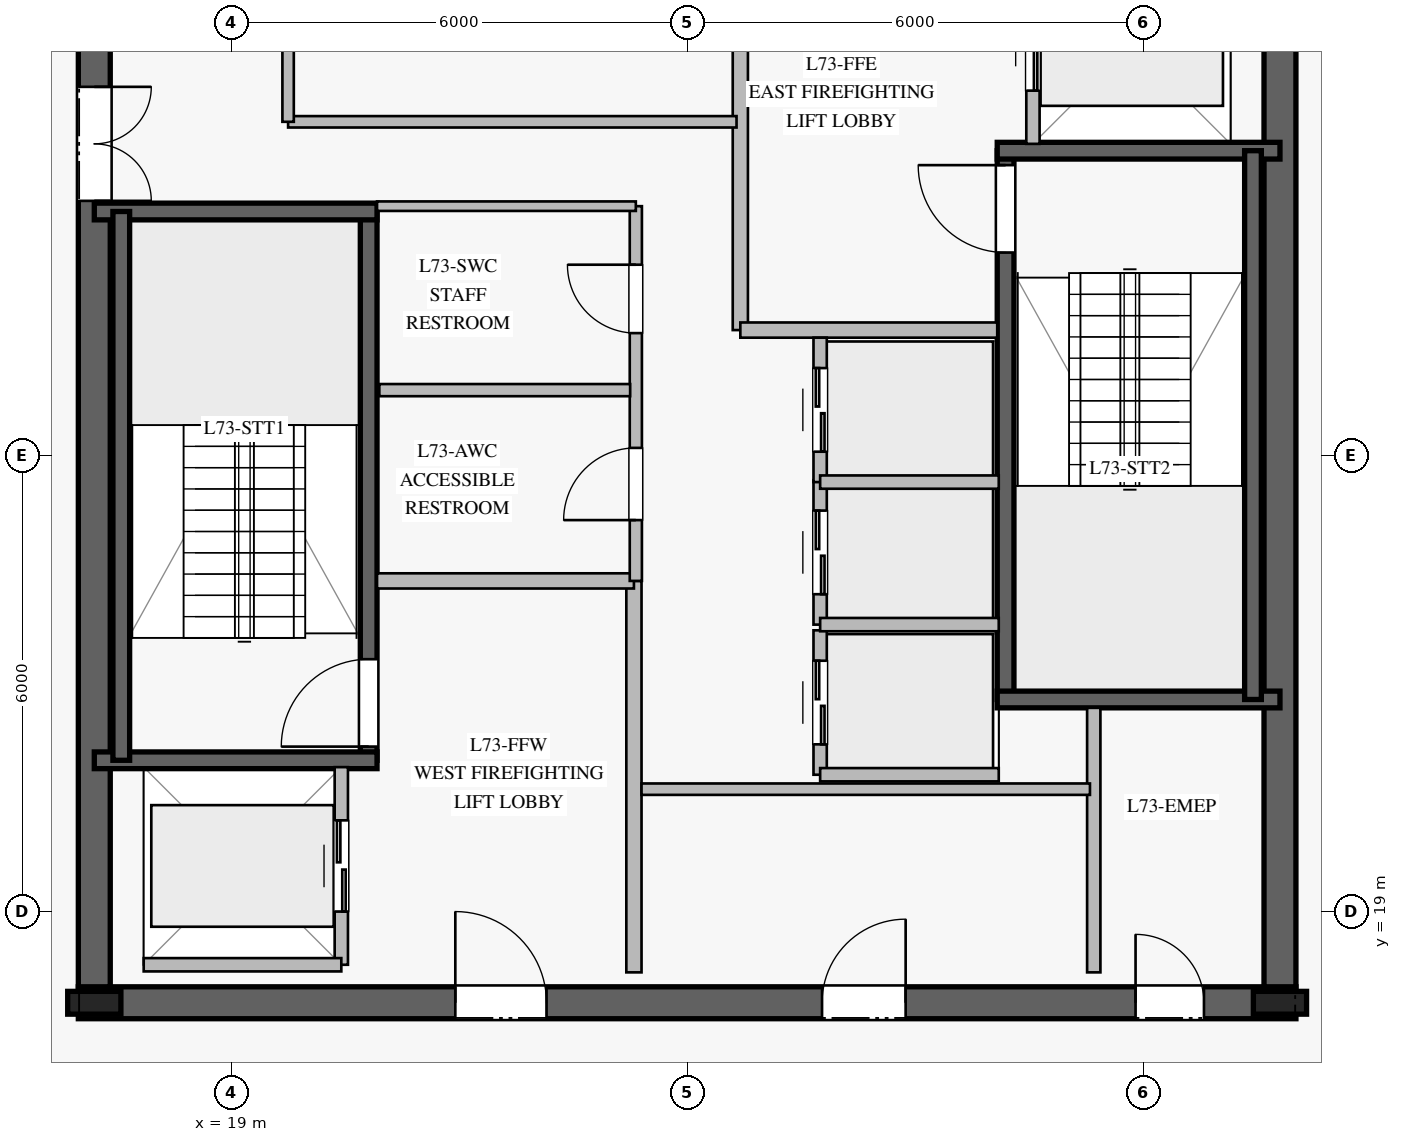
"""IFC4 building model, lengths in metres.
Left out: names, types, materials, properties, quantities, classifications, styles, units other than length and angle.
Written with IfcOpenShell. Run it as: python <this file> out.ifc"""

import sys

from ifc_helpers import new_model, si_unit, direction, frame, frame_2d, origin, origin_2d, place, context, subcontext, project, spatial, rectangle, i_section, extrude, element, fill, save


model = new_model("IFC4")
c1 = context("Model", 3, precision=1e-05, world=origin(), true_north=direction((0.0, 1.0)))
c2 = subcontext(c1, "Body", "Model", "MODEL_VIEW")
j1 = project(units=[si_unit("LENGTHUNIT", "METRE"), si_unit("PLANEANGLEUNIT", "RADIAN")], contexts=[c1])
p1 = place(None, origin())
s1 = spatial("IfcSite", under=j1, at=p1, CompositionType="ELEMENT")
p2 = place(p1, origin())
s2 = spatial("IfcBuilding", under=s1, at=p2, CompositionType="ELEMENT")
p3 = place(p2, frame((0.0, 0.0, 302.2)))
s3 = spatial("IfcBuildingStorey", under=s2, at=p3, CompositionType="ELEMENT", Elevation=302.2)
p4 = place(p3, frame((16.99, 17.8, 0.0), z_axis=(0.0, 0.0, 1.0), x_axis=(1.0, 0.0, 0.0)))
e1 = element("IfcWall", 1, at=p4, inside=s3, PredefinedType="SHEAR", context=c2, shape_type="SweptSolid", body=[
    extrude(rectangle(XDim=16.02, YDim=0.42, at=frame_2d((8.01, 0.0))), origin(), (0.0, 0.0, 1.0), 3.78),
])
p5 = place(p4, frame((4.96, 0.0, 0.0)))
e2 = element("IfcOpeningElement", 2, at=p5, cuts=e1, PredefinedType="OPENING", context=c2, shape_type="SweptSolid", body=[
    extrude(rectangle(XDim=1.2, YDim=2.25, at=frame_2d((0.6, 1.125))), frame((0.0, 0.22, 0.0), z_axis=(0.0, -1.0, 0.0), x_axis=(1.0, 0.0, 0.0)), (0.0, 0.0, 1.0), 0.44),
])
p6 = place(p4, frame((13.91, 0.0, 0.0)))
e3 = element("IfcOpeningElement", 3, at=p6, cuts=e1, PredefinedType="OPENING", context=c2, shape_type="SweptSolid", body=[
    extrude(rectangle(XDim=0.9, YDim=2.1, at=frame_2d((0.45, 1.05))), frame((0.0, 0.22, 0.0), z_axis=(0.0, -1.0, 0.0), x_axis=(1.0, 0.0, 0.0)), (0.0, 0.0, 1.0), 0.44),
])
p7 = place(p4, frame((9.785, 0.0, 0.0)))
e4 = element("IfcOpeningElement", 4, at=p7, cuts=e1, PredefinedType="OPENING", context=c2, shape_type="SweptSolid", body=[
    extrude(rectangle(XDim=1.1, YDim=2.2, at=frame_2d((0.55, 1.1))), frame((0.0, 0.22, 0.0), z_axis=(0.0, -1.0, 0.0), x_axis=(1.0, 0.0, 0.0)), (0.0, 0.0, 1.0), 0.44),
])
p8 = place(p3, frame((17.2, 31.99, 0.0), z_axis=(0.0, 0.0, 1.0), x_axis=(0.0, -1.0, 0.0)))
e5 = element("IfcWall", 5, at=p8, inside=s3, PredefinedType="SHEAR", context=c2, shape_type="SweptSolid", body=[
    extrude(rectangle(XDim=13.98, YDim=0.42, at=frame_2d((6.99, 0.0))), origin(), (0.0, 0.0, 1.0), 3.78),
])
p9 = place(p8, frame((2.14, 0.0, 0.0)))
e6 = element("IfcOpeningElement", 6, at=p9, cuts=e5, PredefinedType="OPENING", context=c2, shape_type="SweptSolid", body=[
    extrude(rectangle(XDim=1.5, YDim=2.2, at=frame_2d((0.75, 1.1))), frame((0.0, 0.22, 0.0), z_axis=(0.0, -1.0, 0.0), x_axis=(1.0, 0.0, 0.0)), (0.0, 0.0, 1.0), 0.44),
])
p10 = place(p3, frame((32.8, 18.01, 0.0), z_axis=(0.0, 0.0, 1.0), x_axis=(0.0, 1.0, 0.0)))
e7 = element("IfcWall", 7, at=p10, inside=s3, PredefinedType="SHEAR", context=c2, shape_type="SweptSolid", body=[
    extrude(rectangle(XDim=13.98, YDim=0.42, at=frame_2d((6.99, 0.0))), origin(), (0.0, 0.0, 1.0), 3.78),
])
for number, where, z_axis, x_axis in (
    (8, (17.2, 17.8, 0.0), (0.0, 0.0, 1.0), (1.0, 0.0, 0.0)),
    (9, (32.8, 17.8, 0.0), (0.0, 0.0, 1.0), (1.0, 0.0, 0.0)),
):
    element("IfcColumn", number, at=place(p3, frame(where, z_axis=z_axis, x_axis=x_axis)), inside=s3, PredefinedType="COLUMN", context=c2, shape_type="SweptSolid", body=[
        extrude(i_section(OverallWidth=0.3, OverallDepth=0.7, WebThickness=0.017, FlangeThickness=0.032, at=origin_2d()), origin(), (0.0, 0.0, 1.0), 4.0),
    ])
p11 = place(p3, frame((20.81, 20.99, 0.0), z_axis=(0.0, 0.0, 1.0), x_axis=(0.0, 1.0, 0.0)))
e10 = element("IfcWall", 10, at=p11, inside=s3, PredefinedType="SOLIDWALL", context=c2, shape_type="SweptSolid", body=[
    extrude(rectangle(XDim=7.22, YDim=0.22, at=frame_2d((3.61, 0.0))), origin(), (0.0, 0.0, 1.0), 3.78),
])
p12 = place(p11, frame((0.18, 0.0, 0.0)))
e11 = element("IfcOpeningElement", 11, at=p12, cuts=e10, PredefinedType="OPENING", context=c2, shape_type="SweptSolid", body=[
    extrude(rectangle(XDim=1.15, YDim=2.2, at=frame_2d((0.575, 1.1))), frame((0.0, 0.12, 0.0), z_axis=(0.0, -1.0, 0.0), x_axis=(1.0, 0.0, 0.0)), (0.0, 0.0, 1.0), 0.24),
])
for number, where, z_axis, x_axis in (
    (12, (17.2, 20.99, 0.0), (0.0, 0.0, 1.0), (1.0, 0.0, 0.0)),
    (13, (17.2, 28.21, 0.0), (0.0, 0.0, 1.0), (1.0, 0.0, 0.0)),
):
    element("IfcWall", number, at=place(p3, frame(where, z_axis=z_axis, x_axis=x_axis)), inside=s3, PredefinedType="SOLIDWALL", context=c2, shape_type="SweptSolid", body=[
        extrude(rectangle(XDim=3.72, YDim=0.22, at=frame_2d((1.86, 0.0))), origin(), (0.0, 0.0, 1.0), 3.78),
    ])
p13 = place(p3, frame((17.555, 28.21, 0.0), z_axis=(0.0, 0.0, 1.0), x_axis=(0.0, -1.0, 0.0)))
e14 = element("IfcWall", 14, at=p13, inside=s3, PredefinedType="SOLIDWALL", context=c2, shape_type="SweptSolid", body=[
    extrude(rectangle(XDim=7.22, YDim=0.22, at=frame_2d((3.61, 0.0))), origin(), (0.0, 0.0, 1.0), 3.78),
])
p14 = place(p3, frame((29.19, 21.79, 0.0), z_axis=(0.0, 0.0, 1.0), x_axis=(0.0, 1.0, 0.0)))
e15 = element("IfcWall", 15, at=p14, inside=s3, PredefinedType="SOLIDWALL", context=c2, shape_type="SweptSolid", body=[
    extrude(rectangle(XDim=7.22, YDim=0.22, at=frame_2d((3.61, 0.0))), origin(), (0.0, 0.0, 1.0), 3.78),
])
p15 = place(p14, frame((5.88, 0.0, 0.0)))
e16 = element("IfcOpeningElement", 16, at=p15, cuts=e15, PredefinedType="OPENING", context=c2, shape_type="SweptSolid", body=[
    extrude(rectangle(XDim=1.15, YDim=2.2, at=frame_2d((0.575, 1.1))), frame((0.0, 0.12, 0.0), z_axis=(0.0, -1.0, 0.0), x_axis=(1.0, 0.0, 0.0)), (0.0, 0.0, 1.0), 0.24),
])
for number, where, z_axis, x_axis in (
    (17, (29.08, 21.79, 0.0), (0.0, 0.0, 1.0), (1.0, 0.0, 0.0)),
    (18, (29.08, 29.01, 0.0), (0.0, 0.0, 1.0), (1.0, 0.0, 0.0)),
):
    element("IfcWall", number, at=place(p3, frame(where, z_axis=z_axis, x_axis=x_axis)), inside=s3, PredefinedType="SOLIDWALL", context=c2, shape_type="SweptSolid", body=[
        extrude(rectangle(XDim=3.72, YDim=0.22, at=frame_2d((1.86, 0.0))), origin(), (0.0, 0.0, 1.0), 3.78),
    ])
p16 = place(p3, frame((32.445, 29.01, 0.0), z_axis=(0.0, 0.0, 1.0), x_axis=(0.0, -1.0, 0.0)))
e19 = element("IfcWall", 19, at=p16, inside=s3, PredefinedType="SOLIDWALL", context=c2, shape_type="SweptSolid", body=[
    extrude(rectangle(XDim=7.22, YDim=0.22, at=frame_2d((3.61, 0.0))), origin(), (0.0, 0.0, 1.0), 3.78),
])
p17 = place(p3, frame((24.3, 18.2, 0.0), z_axis=(0.0, 0.0, 1.0), x_axis=(0.0, 1.0, 0.0)))
e20 = element("IfcWall", 20, at=p17, inside=s3, PredefinedType="PARTITIONING", context=c2, shape_type="SweptSolid", body=[
    extrude(rectangle(XDim=5.15, YDim=0.2, at=frame_2d((2.575, 0.0))), origin(), (0.0, 0.0, 1.0), 3.78),
])
p18 = place(p3, frame((20.92, 23.35, 0.0), z_axis=(0.0, 0.0, 1.0), x_axis=(1.0, 0.0, 0.0)))
e21 = element("IfcWall", 21, at=p18, inside=s3, PredefinedType="PARTITIONING", context=c2, shape_type="SweptSolid", body=[
    extrude(rectangle(XDim=3.38, YDim=0.2, at=frame_2d((1.69, 0.0))), origin(), (0.0, 0.0, 1.0), 3.78),
])
p19 = place(p3, frame((25.7, 26.65, 0.0), z_axis=(0.0, 0.0, 1.0), x_axis=(0.0, 1.0, 0.0)))
e22 = element("IfcWall", 22, at=p19, inside=s3, PredefinedType="PARTITIONING", context=c2, shape_type="SweptSolid", body=[
    extrude(rectangle(XDim=5.15, YDim=0.2, at=frame_2d((2.575, 0.0))), origin(), (0.0, 0.0, 1.0), 3.78),
])
p20 = place(p3, frame((25.7, 26.65, 0.0), z_axis=(0.0, 0.0, 1.0), x_axis=(1.0, 0.0, 0.0)))
e23 = element("IfcWall", 23, at=p20, inside=s3, PredefinedType="PARTITIONING", context=c2, shape_type="SweptSolid", body=[
    extrude(rectangle(XDim=3.38, YDim=0.2, at=frame_2d((1.69, 0.0))), origin(), (0.0, 0.0, 1.0), 3.78),
])
p21 = place(p3, frame((24.325, 23.35, 0.0), z_axis=(0.0, 0.0, 1.0), x_axis=(0.0, 1.0, 0.0)))
e24 = element("IfcWall", 24, at=p21, inside=s3, PredefinedType="PLUMBINGWALL", context=c2, shape_type="SweptSolid", body=[
    extrude(rectangle(XDim=4.93, YDim=0.16, at=frame_2d((2.465, 0.0))), origin(), (0.0, 0.0, 1.0), 3.78),
])
p22 = place(p21, frame((0.8, 0.0, 0.0)))
e25 = element("IfcOpeningElement", 25, at=p22, cuts=e24, PredefinedType="OPENING", context=c2, shape_type="SweptSolid", body=[
    extrude(rectangle(XDim=0.95, YDim=2.1, at=frame_2d((0.475, 1.05))), frame((0.0, 0.09, 0.0), z_axis=(0.0, -1.0, 0.0), x_axis=(1.0, 0.0, 0.0)), (0.0, 0.0, 1.0), 0.18),
])
p23 = place(p21, frame((3.26, 0.0, 0.0)))
e26 = element("IfcOpeningElement", 26, at=p23, cuts=e24, PredefinedType="OPENING", context=c2, shape_type="SweptSolid", body=[
    extrude(rectangle(XDim=0.9, YDim=2.1, at=frame_2d((0.45, 1.05))), frame((0.0, 0.09, 0.0), z_axis=(0.0, -1.0, 0.0), x_axis=(1.0, 0.0, 0.0)), (0.0, 0.0, 1.0), 0.18),
])
p24 = place(p3, frame((20.92, 28.28, 0.0), z_axis=(0.0, 0.0, 1.0), x_axis=(1.0, 0.0, 0.0)))
e27 = element("IfcWall", 27, at=p24, inside=s3, PredefinedType="PARTITIONING", context=c2, shape_type="SweptSolid", body=[
    extrude(rectangle(XDim=3.405, YDim=0.125, at=frame_2d((1.703, 0.0))), origin(), (0.0, 0.0, 1.0), 3.78),
])
p25 = place(p3, frame((20.95, 25.86, 0.0), z_axis=(0.0, 0.0, 1.0), x_axis=(1.0, 0.0, 0.0)))
e28 = element("IfcWall", 28, at=p25, inside=s3, PredefinedType="PLUMBINGWALL", context=c2, shape_type="SweptSolid", body=[
    extrude(rectangle(XDim=3.3, YDim=0.16, at=frame_2d((1.65, 0.0))), origin(), (0.0, 0.0, 1.0), 3.78),
])
p26 = place(p3, frame((30.35, 18.2, 0.0), z_axis=(0.0, 0.0, 1.0), x_axis=(0.0, 1.0, 0.0)))
e29 = element("IfcWall", 29, at=p26, inside=s3, PredefinedType="PARTITIONING", context=c2, shape_type="SweptSolid", body=[
    extrude(rectangle(XDim=3.48, YDim=0.175, at=frame_2d((1.74, 0.0))), origin(), (0.0, 0.0, 1.0), 3.78),
])
p27 = place(p3, frame((24.4, 20.61, 0.0), z_axis=(0.0, 0.0, 1.0), x_axis=(1.0, 0.0, 0.0)))
e30 = element("IfcWall", 30, at=p27, inside=s3, PredefinedType="PARTITIONING", context=c2, shape_type="SweptSolid", body=[
    extrude(rectangle(XDim=5.9, YDim=0.15, at=frame_2d((2.95, 0.0))), origin(), (0.0, 0.0, 1.0), 3.78),
])
p28 = place(p3, frame((19.75, 29.39, 0.0), z_axis=(0.0, 0.0, 1.0), x_axis=(1.0, 0.0, 0.0)))
e31 = element("IfcWall", 31, at=p28, inside=s3, PredefinedType="PARTITIONING", context=c2, shape_type="SweptSolid", body=[
    extrude(rectangle(XDim=5.9, YDim=0.15, at=frame_2d((2.95, 0.0))), origin(), (0.0, 0.0, 1.0), 3.78),
])
p29 = place(p3, frame((19.75, 29.39, 0.0), z_axis=(0.0, 0.0, 1.0), x_axis=(0.0, 1.0, 0.0)))
e32 = element("IfcWall", 32, at=p29, inside=s3, PredefinedType="PARTITIONING", context=c2, shape_type="SweptSolid", body=[
    extrude(rectangle(XDim=2.41, YDim=0.15, at=frame_2d((1.205, 0.0))), origin(), (0.0, 0.0, 1.0), 3.78),
])
p30 = place(p3, frame((26.75, 20.8, 0.0), z_axis=(0.0, 0.0, 1.0), x_axis=(0.0, 1.0, 0.0)))
e33 = element("IfcWall", 33, at=p30, inside=s3, PredefinedType="PARTITIONING", context=c2, shape_type="SweptSolid", body=[
    extrude(rectangle(XDim=1.9, YDim=0.175, at=frame_2d((0.95, 0.0))), origin(), (0.0, 0.0, 1.0), 3.78),
])
p31 = place(p30, frame((0.4, 0.0, 0.0)))
e34 = element("IfcOpeningElement", 34, at=p31, cuts=e33, PredefinedType="OPENING", context=c2, shape_type="SweptSolid", body=[
    extrude(rectangle(XDim=1.1, YDim=2.2, at=frame_2d((0.55, 1.1))), frame((0.0, 0.098, 0.0), z_axis=(0.0, -1.0, 0.0), x_axis=(1.0, 0.0, 0.0)), (0.0, 0.0, 1.0), 0.195),
])
p32 = place(p3, frame((26.75, 20.8, 0.0), z_axis=(0.0, 0.0, 1.0), x_axis=(1.0, 0.0, 0.0)))
e35 = element("IfcWall", 35, at=p32, inside=s3, PredefinedType="PARTITIONING", context=c2, shape_type="SweptSolid", body=[
    extrude(rectangle(XDim=2.35, YDim=0.175, at=frame_2d((1.175, 0.0))), origin(), (0.0, 0.0, 1.0), 3.78),
])
p33 = place(p3, frame((26.75, 22.775, 0.0), z_axis=(0.0, 0.0, 1.0), x_axis=(0.0, 1.0, 0.0)))
e36 = element("IfcWall", 36, at=p33, inside=s3, PredefinedType="PARTITIONING", context=c2, shape_type="SweptSolid", body=[
    extrude(rectangle(XDim=1.9, YDim=0.175, at=frame_2d((0.95, 0.0))), origin(), (0.0, 0.0, 1.0), 3.78),
])
p34 = place(p33, frame((0.4, 0.0, 0.0)))
e37 = element("IfcOpeningElement", 37, at=p34, cuts=e36, PredefinedType="OPENING", context=c2, shape_type="SweptSolid", body=[
    extrude(rectangle(XDim=1.1, YDim=2.2, at=frame_2d((0.55, 1.1))), frame((0.0, 0.098, 0.0), z_axis=(0.0, -1.0, 0.0), x_axis=(1.0, 0.0, 0.0)), (0.0, 0.0, 1.0), 0.195),
])
p35 = place(p3, frame((26.75, 22.775, 0.0), z_axis=(0.0, 0.0, 1.0), x_axis=(1.0, 0.0, 0.0)))
e38 = element("IfcWall", 38, at=p35, inside=s3, PredefinedType="PARTITIONING", context=c2, shape_type="SweptSolid", body=[
    extrude(rectangle(XDim=2.35, YDim=0.175, at=frame_2d((1.175, 0.0))), origin(), (0.0, 0.0, 1.0), 3.78),
])
p36 = place(p3, frame((26.75, 24.65, 0.0), z_axis=(0.0, 0.0, 1.0), x_axis=(0.0, 1.0, 0.0)))
e39 = element("IfcWall", 39, at=p36, inside=s3, PredefinedType="PARTITIONING", context=c2, shape_type="SweptSolid", body=[
    extrude(rectangle(XDim=1.9, YDim=0.175, at=frame_2d((0.95, 0.0))), origin(), (0.0, 0.0, 1.0), 3.78),
])
p37 = place(p36, frame((0.4, 0.0, 0.0)))
e40 = element("IfcOpeningElement", 40, at=p37, cuts=e39, PredefinedType="OPENING", context=c2, shape_type="SweptSolid", body=[
    extrude(rectangle(XDim=1.1, YDim=2.2, at=frame_2d((0.55, 1.1))), frame((0.0, 0.098, 0.0), z_axis=(0.0, -1.0, 0.0), x_axis=(1.0, 0.0, 0.0)), (0.0, 0.0, 1.0), 0.195),
])
p38 = place(p3, frame((26.75, 24.65, 0.0), z_axis=(0.0, 0.0, 1.0), x_axis=(1.0, 0.0, 0.0)))
e41 = element("IfcWall", 41, at=p38, inside=s3, PredefinedType="PARTITIONING", context=c2, shape_type="SweptSolid", body=[
    extrude(rectangle(XDim=2.35, YDim=0.175, at=frame_2d((1.175, 0.0))), origin(), (0.0, 0.0, 1.0), 3.78),
])
p39 = place(p3, frame((20.45, 18.3, 0.0), z_axis=(0.0, 0.0, 1.0), x_axis=(0.0, 1.0, 0.0)))
e42 = element("IfcWall", 42, at=p39, inside=s3, PredefinedType="PARTITIONING", context=c2, shape_type="SweptSolid", body=[
    extrude(rectangle(XDim=2.6, YDim=0.175, at=frame_2d((1.3, 0.0))), origin(), (0.0, 0.0, 1.0), 3.78),
])
p40 = place(p39, frame((0.7, 0.0, 0.0)))
e43 = element("IfcOpeningElement", 43, at=p40, cuts=e42, PredefinedType="OPENING", context=c2, shape_type="SweptSolid", body=[
    extrude(rectangle(XDim=1.2, YDim=2.2, at=frame_2d((0.6, 1.1))), frame((0.0, 0.098, 0.0), z_axis=(0.0, -1.0, 0.0), x_axis=(1.0, 0.0, 0.0)), (0.0, 0.0, 1.0), 0.195),
])
p41 = place(p3, frame((17.85, 18.3, 0.0), z_axis=(0.0, 0.0, 1.0), x_axis=(1.0, 0.0, 0.0)))
e44 = element("IfcWall", 44, at=p41, inside=s3, PredefinedType="PARTITIONING", context=c2, shape_type="SweptSolid", body=[
    extrude(rectangle(XDim=2.6, YDim=0.175, at=frame_2d((1.3, 0.0))), origin(), (0.0, 0.0, 1.0), 3.78),
])
p42 = place(p3, frame((29.55, 29.1, 0.0), z_axis=(0.0, 0.0, 1.0), x_axis=(0.0, 1.0, 0.0)))
e45 = element("IfcWall", 45, at=p42, inside=s3, PredefinedType="PARTITIONING", context=c2, shape_type="SweptSolid", body=[
    extrude(rectangle(XDim=2.6, YDim=0.175, at=frame_2d((1.3, 0.0))), origin(), (0.0, 0.0, 1.0), 3.78),
])
p43 = place(p42, frame((0.7, 0.0, 0.0)))
e46 = element("IfcOpeningElement", 46, at=p43, cuts=e45, PredefinedType="OPENING", context=c2, shape_type="SweptSolid", body=[
    extrude(rectangle(XDim=1.2, YDim=2.2, at=frame_2d((0.6, 1.1))), frame((0.0, 0.098, 0.0), z_axis=(0.0, -1.0, 0.0), x_axis=(1.0, 0.0, 0.0)), (0.0, 0.0, 1.0), 0.195),
])
p44 = place(p12, origin())
e47 = element("IfcDoor", 47, at=p44, inside=s3, OperationType="SINGLE_SWING_LEFT", PredefinedType="DOOR", context=c2, shape_type="SweptSolid", body=[
    extrude(rectangle(XDim=1.15, YDim=2.2, at=frame_2d((0.575, 1.1))), frame((0.0, 0.025, 0.0), z_axis=(0.0, -1.0, 0.0), x_axis=(1.0, 0.0, 0.0)), (0.0, 0.0, 1.0), 0.05),
])
fill(e11, e47)
p45 = place(p15, origin())
e48 = element("IfcDoor", 48, at=p45, inside=s3, OperationType="SINGLE_SWING_RIGHT", PredefinedType="DOOR", context=c2, shape_type="SweptSolid", body=[
    extrude(rectangle(XDim=1.15, YDim=2.2, at=frame_2d((0.575, 1.1))), frame((0.0, 0.025, 0.0), z_axis=(0.0, -1.0, 0.0), x_axis=(1.0, 0.0, 0.0)), (0.0, 0.0, 1.0), 0.05),
])
fill(e16, e48)
p46 = place(p5, origin())
e49 = element("IfcDoor", 49, at=p46, inside=s3, OperationType="SINGLE_SWING_LEFT", PredefinedType="DOOR", context=c2, shape_type="SweptSolid", body=[
    extrude(rectangle(XDim=1.2, YDim=2.25, at=frame_2d((0.6, 1.125))), frame((0.0, 0.025, 0.0), z_axis=(0.0, -1.0, 0.0), x_axis=(1.0, 0.0, 0.0)), (0.0, 0.0, 1.0), 0.05),
])
fill(e2, e49)
p47 = place(p9, origin())
e50 = element("IfcDoor", 50, at=p47, inside=s3, OperationType="DOUBLE_DOOR_SINGLE_SWING", PredefinedType="DOOR", context=c2, shape_type="SweptSolid", body=[
    extrude(rectangle(XDim=1.5, YDim=2.2, at=frame_2d((0.75, 1.1))), frame((0.0, 0.025, 0.0), z_axis=(0.0, -1.0, 0.0), x_axis=(1.0, 0.0, 0.0)), (0.0, 0.0, 1.0), 0.05),
])
fill(e6, e50)
p48 = place(p22, origin())
e51 = element("IfcDoor", 51, at=p48, inside=s3, OperationType="SINGLE_SWING_LEFT", PredefinedType="DOOR", context=c2, shape_type="SweptSolid", body=[
    extrude(rectangle(XDim=0.95, YDim=2.1, at=frame_2d((0.475, 1.05))), frame((0.0, 0.025, 0.0), z_axis=(0.0, -1.0, 0.0), x_axis=(1.0, 0.0, 0.0)), (0.0, 0.0, 1.0), 0.05),
])
fill(e25, e51)
p49 = place(p23, origin())
e52 = element("IfcDoor", 52, at=p49, inside=s3, OperationType="SINGLE_SWING_RIGHT", PredefinedType="DOOR", context=c2, shape_type="SweptSolid", body=[
    extrude(rectangle(XDim=0.9, YDim=2.1, at=frame_2d((0.45, 1.05))), frame((0.0, 0.025, 0.0), z_axis=(0.0, -1.0, 0.0), x_axis=(1.0, 0.0, 0.0)), (0.0, 0.0, 1.0), 0.05),
])
fill(e26, e52)
p50 = place(p6, origin())
e53 = element("IfcDoor", 53, at=p50, inside=s3, OperationType="SINGLE_SWING_LEFT", PredefinedType="DOOR", context=c2, shape_type="SweptSolid", body=[
    extrude(rectangle(XDim=0.9, YDim=2.1, at=frame_2d((0.45, 1.05))), frame((0.0, 0.025, 0.0), z_axis=(0.0, -1.0, 0.0), x_axis=(1.0, 0.0, 0.0)), (0.0, 0.0, 1.0), 0.05),
])
fill(e3, e53)
p51 = place(p7, origin())
e54 = element("IfcDoor", 54, at=p51, inside=s3, OperationType="SINGLE_SWING_RIGHT", PredefinedType="DOOR", context=c2, shape_type="SweptSolid", body=[
    extrude(rectangle(XDim=1.1, YDim=2.2, at=frame_2d((0.55, 1.1))), frame((0.0, 0.025, 0.0), z_axis=(0.0, -1.0, 0.0), x_axis=(1.0, 0.0, 0.0)), (0.0, 0.0, 1.0), 0.05),
])
fill(e4, e54)
p52 = place(p31, origin())
e55 = element("IfcDoor", 55, at=p52, inside=s3, OperationType="DOUBLE_DOOR_SLIDING", PredefinedType="DOOR", context=c2, shape_type="SweptSolid", body=[
    extrude(rectangle(XDim=1.1, YDim=2.2, at=frame_2d((0.55, 1.1))), frame((0.0, 0.025, 0.0), z_axis=(0.0, -1.0, 0.0), x_axis=(1.0, 0.0, 0.0)), (0.0, 0.0, 1.0), 0.05),
])
fill(e34, e55)
p53 = place(p34, origin())
e56 = element("IfcDoor", 56, at=p53, inside=s3, OperationType="DOUBLE_DOOR_SLIDING", PredefinedType="DOOR", context=c2, shape_type="SweptSolid", body=[
    extrude(rectangle(XDim=1.1, YDim=2.2, at=frame_2d((0.55, 1.1))), frame((0.0, 0.025, 0.0), z_axis=(0.0, -1.0, 0.0), x_axis=(1.0, 0.0, 0.0)), (0.0, 0.0, 1.0), 0.05),
])
fill(e37, e56)
p54 = place(p37, origin())
e57 = element("IfcDoor", 57, at=p54, inside=s3, OperationType="DOUBLE_DOOR_SLIDING", PredefinedType="DOOR", context=c2, shape_type="SweptSolid", body=[
    extrude(rectangle(XDim=1.1, YDim=2.2, at=frame_2d((0.55, 1.1))), frame((0.0, 0.025, 0.0), z_axis=(0.0, -1.0, 0.0), x_axis=(1.0, 0.0, 0.0)), (0.0, 0.0, 1.0), 0.05),
])
fill(e40, e57)
p55 = place(p40, origin())
e58 = element("IfcDoor", 58, at=p55, inside=s3, OperationType="DOUBLE_DOOR_SLIDING", PredefinedType="DOOR", context=c2, shape_type="SweptSolid", body=[
    extrude(rectangle(XDim=1.2, YDim=2.2, at=frame_2d((0.6, 1.1))), frame((0.0, 0.025, 0.0), z_axis=(0.0, -1.0, 0.0), x_axis=(1.0, 0.0, 0.0)), (0.0, 0.0, 1.0), 0.05),
])
fill(e43, e58)
p56 = place(p43, origin())
e59 = element("IfcDoor", 59, at=p56, inside=s3, OperationType="DOUBLE_DOOR_SLIDING", PredefinedType="DOOR", context=c2, shape_type="SweptSolid", body=[
    extrude(rectangle(XDim=1.2, YDim=2.2, at=frame_2d((0.6, 1.1))), frame((0.0, 0.025, 0.0), z_axis=(0.0, -1.0, 0.0), x_axis=(1.0, 0.0, 0.0)), (0.0, 0.0, 1.0), 0.05),
])
fill(e46, e59)
save(model, sys.argv[1])
